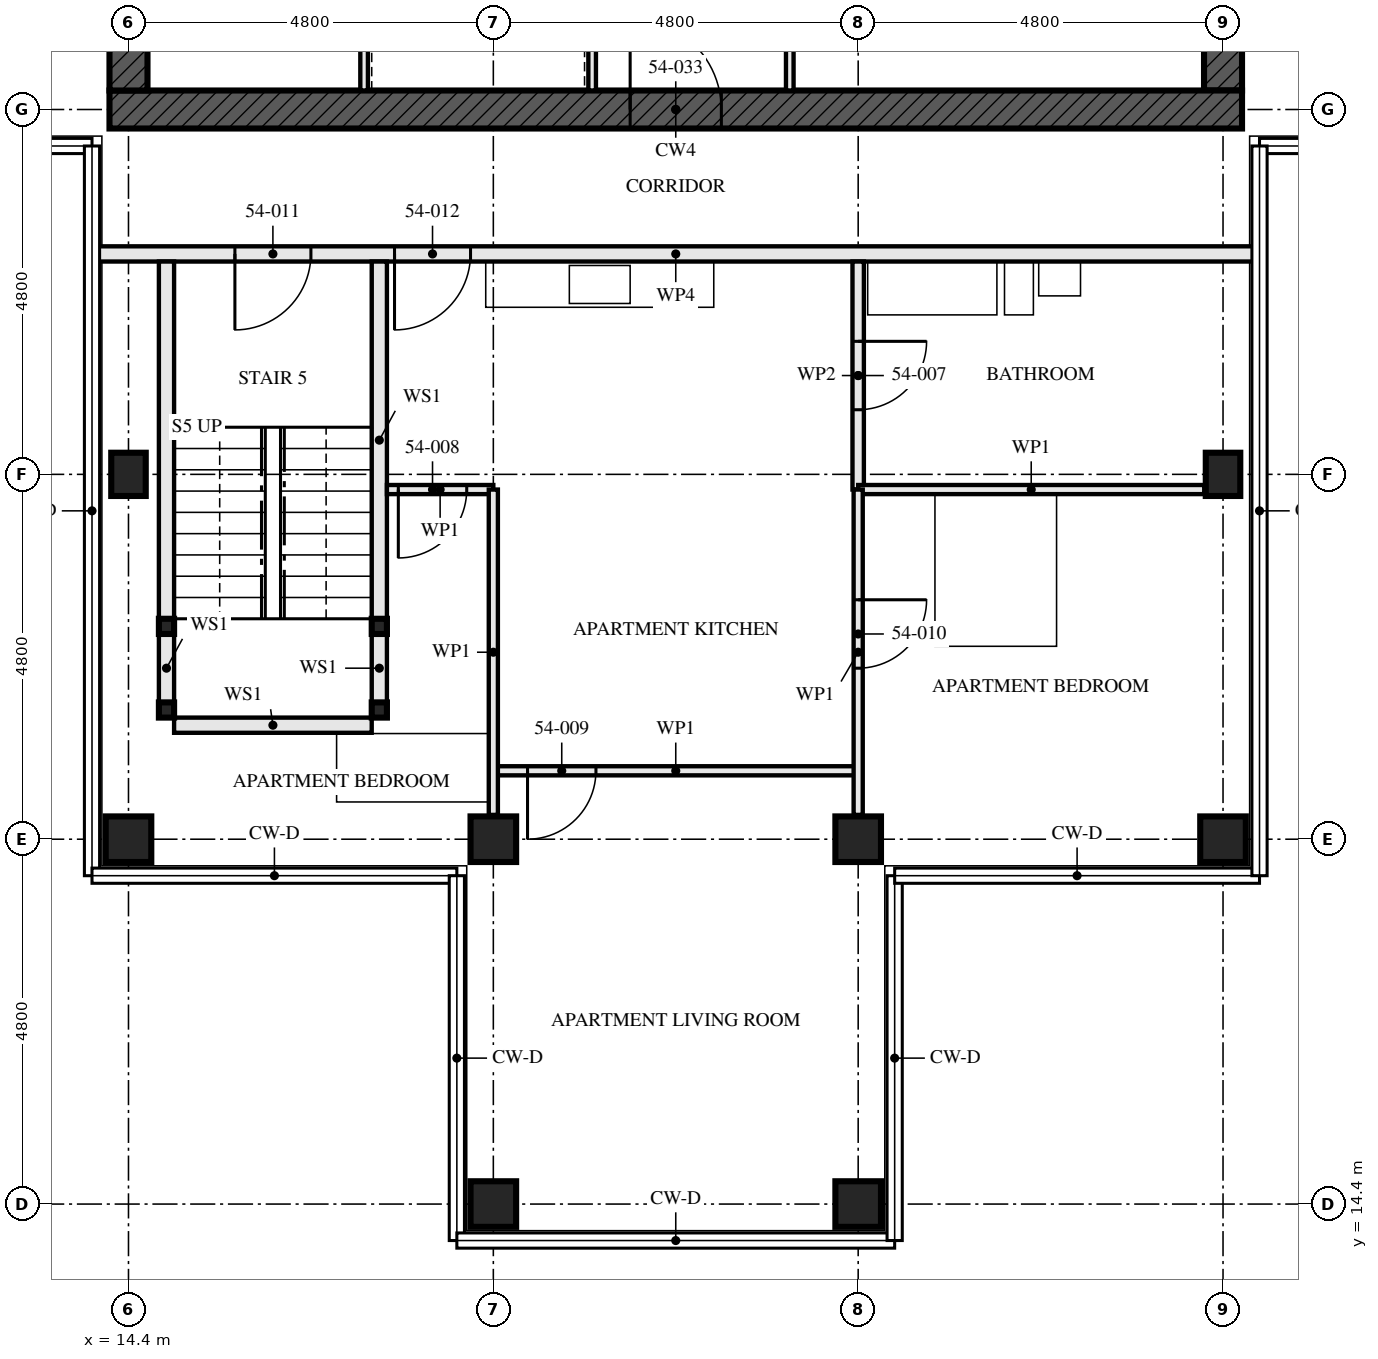
"""IFC4 building model, lengths in metres.
Left out: names, types, materials, properties, quantities, classifications, styles, units other than length and angle.
Written with IfcOpenShell. Run it as: python <this file> out.ifc"""

import sys

from ifc_helpers import new_model, si_unit, direction, frame, frame_2d, origin, origin_2d, place, context, subcontext, project, spatial, rectangle, hollow_rectangle, i_section, extrude, element, fill, save


model = new_model("IFC4")
c1 = context("Model", 3, precision=1e-05, world=origin(), true_north=direction((0.0, 1.0)))
c2 = subcontext(c1, "Body", "Model", "MODEL_VIEW")
j1 = project(units=[si_unit("LENGTHUNIT", "METRE"), si_unit("PLANEANGLEUNIT", "RADIAN")], contexts=[c1])
p1 = place(None, origin())
s1 = spatial("IfcSite", under=j1, at=p1, CompositionType="ELEMENT")
p2 = place(p1, origin())
s2 = spatial("IfcBuilding", under=s1, at=p2, CompositionType="ELEMENT")
p3 = place(p2, frame((0.0, 0.0, 198.0)))
s3 = spatial("IfcBuildingStorey", under=s2, at=p3, CompositionType="ELEMENT", Elevation=198.0)
p4 = place(p3, frame((14.4, 19.2, 0.0), z_axis=(0.0, 0.0, 1.0), x_axis=(0.0, 1.0, 0.0)))
e1 = element("IfcColumn", 1, at=p4, inside=s3, PredefinedType="COLUMN", context=c2, shape_type="SweptSolid", body=[
    extrude(hollow_rectangle(XDim=0.6, YDim=0.6, WallThickness=0.05, at=origin_2d()), origin(), (0.0, 0.0, 1.0), 3.5),
])
p5 = place(p3, frame((14.4, 24.0, 0.0), z_axis=(0.0, 0.0, 1.0), x_axis=(1.0, 0.0, 0.0)))
e2 = element("IfcColumn", 2, at=p5, inside=s3, PredefinedType="COLUMN", context=c2, shape_type="SweptSolid", body=[
    extrude(i_section(OverallWidth=0.454, OverallDepth=0.569, WebThickness=0.078, FlangeThickness=0.125, FilletRadius=0.015, at=origin_2d()), origin(), (0.0, 0.0, 1.0), 3.5),
])
for number, where, z_axis, x_axis in (
    (3, (19.2, 14.4, 0.0), (0.0, 0.0, 1.0), (0.0, 1.0, 0.0)),
    (4, (19.2, 19.2, 0.0), (0.0, 0.0, 1.0), (0.0, 1.0, 0.0)),
    (5, (24.0, 14.4, 0.0), (0.0, 0.0, 1.0), (0.0, 1.0, 0.0)),
    (6, (24.0, 19.2, 0.0), (0.0, 0.0, 1.0), (0.0, 1.0, 0.0)),
    (7, (28.8, 19.2, 0.0), (0.0, 0.0, 1.0), (0.0, 1.0, 0.0)),
):
    element("IfcColumn", number, at=place(p3, frame(where, z_axis=z_axis, x_axis=x_axis)), inside=s3, PredefinedType="COLUMN", context=c2, shape_type="SweptSolid", body=[
        extrude(hollow_rectangle(XDim=0.6, YDim=0.6, WallThickness=0.05, at=origin_2d()), origin(), (0.0, 0.0, 1.0), 3.5),
    ])
p6 = place(p3, frame((28.8, 24.0, 0.0), z_axis=(0.0, 0.0, 1.0), x_axis=(1.0, 0.0, 0.0)))
e8 = element("IfcColumn", 8, at=p6, inside=s3, PredefinedType="COLUMN", context=c2, shape_type="SweptSolid", body=[
    extrude(i_section(OverallWidth=0.454, OverallDepth=0.569, WebThickness=0.078, FlangeThickness=0.125, FilletRadius=0.015, at=origin_2d()), origin(), (0.0, 0.0, 1.0), 3.5),
])
p7 = place(p3, frame((14.15, 28.8, -0.17), z_axis=(0.0, 0.0, 1.0), x_axis=(1.0, 0.0, 0.0)))
e9 = element("IfcWall", 9, at=p7, inside=s3, PredefinedType="SHEAR", context=c2, shape_type="SweptSolid", body=[
    extrude(rectangle(XDim=14.9, YDim=0.5, at=frame_2d((7.45, 0.0))), origin(), (0.0, 0.0, 1.0), 3.5),
])
p8 = place(p7, frame((6.85, 0.0, 0.17)))
e10 = element("IfcOpeningElement", 10, at=p8, cuts=e9, PredefinedType="OPENING", context=c2, shape_type="SweptSolid", body=[
    extrude(rectangle(XDim=1.2, YDim=2.1, at=frame_2d((0.6, 1.05))), frame((0.0, 0.26, 0.0), z_axis=(0.0, -1.0, 0.0), x_axis=(1.0, 0.0, 0.0)), (0.0, 0.0, 1.0), 0.521),
])
p9 = place(p3, frame((14.4, 42.95, -0.17), z_axis=(0.0, 0.0, 1.0), x_axis=(0.0, -1.0, 0.0)))
e11 = element("IfcWall", 11, at=p9, inside=s3, PredefinedType="SHEAR", context=c2, shape_type="SweptSolid", body=[
    extrude(rectangle(XDim=13.9, YDim=0.5, at=frame_2d((6.95, 0.0))), origin(), (0.0, 0.0, 1.0), 3.5),
])
p10 = place(p9, frame((6.35, 0.0, 0.17)))
e12 = element("IfcOpeningElement", 12, at=p10, cuts=e11, PredefinedType="OPENING", context=c2, shape_type="SweptSolid", body=[
    extrude(rectangle(XDim=1.2, YDim=2.1, at=frame_2d((0.6, 1.05))), frame((0.0, 0.26, 0.0), z_axis=(0.0, -1.0, 0.0), x_axis=(1.0, 0.0, 0.0)), (0.0, 0.0, 1.0), 0.521),
])
p11 = place(p3, frame((28.8, 29.05, -0.17), z_axis=(0.0, 0.0, 1.0), x_axis=(0.0, 1.0, 0.0)))
e13 = element("IfcWall", 13, at=p11, inside=s3, PredefinedType="SHEAR", context=c2, shape_type="SweptSolid", body=[
    extrude(rectangle(XDim=13.9, YDim=0.5, at=frame_2d((6.95, 0.0))), origin(), (0.0, 0.0, 1.0), 3.5),
])
p12 = place(p11, frame((6.35, 0.0, 0.17)))
e14 = element("IfcOpeningElement", 14, at=p12, cuts=e13, PredefinedType="OPENING", context=c2, shape_type="SweptSolid", body=[
    extrude(rectangle(XDim=1.2, YDim=2.1, at=frame_2d((0.6, 1.05))), frame((0.0, 0.26, 0.0), z_axis=(0.0, -1.0, 0.0), x_axis=(1.0, 0.0, 0.0)), (0.0, 0.0, 1.0), 0.521),
])
for number, where, z_axis, x_axis in (
    (15, (14.9, 20.9, 0.0), (0.0, 0.0, 1.0), (1.0, 0.0, 0.0)),
    (16, (17.7, 20.9, 0.0), (0.0, 0.0, 1.0), (1.0, 0.0, 0.0)),
    (17, (14.9, 22.0, 0.0), (0.0, 0.0, 1.0), (1.0, 0.0, 0.0)),
    (18, (17.7, 22.0, 0.0), (0.0, 0.0, 1.0), (1.0, 0.0, 0.0)),
):
    element("IfcColumn", number, at=place(p3, frame(where, z_axis=z_axis, x_axis=x_axis)), inside=s3, PredefinedType="COLUMN", context=c2, shape_type="SweptSolid", body=[
        extrude(hollow_rectangle(XDim=0.2, YDim=0.2, WallThickness=0.008, at=origin_2d()), origin(), (0.0, 0.0, 1.0), 3.33),
    ])
p13 = place(p3, frame((14.9, 21.0, 0.0), z_axis=(0.0, 0.0, 1.0), x_axis=(0.0, 1.0, 0.0)))
e19 = element("IfcWall", 19, at=p13, inside=s3, PredefinedType="SOLIDWALL", context=c2, shape_type="SweptSolid", body=[
    extrude(rectangle(XDim=0.9, YDim=0.2, at=frame_2d((0.45, 0.0))), origin(), (0.0, 0.0, 1.0), 2.99),
])
p14 = place(p3, frame((14.9, 22.1, 0.0), z_axis=(0.0, 0.0, 1.0), x_axis=(0.0, 1.0, 0.0)))
e20 = element("IfcWall", 20, at=p14, inside=s3, PredefinedType="SOLIDWALL", context=c2, shape_type="SweptSolid", body=[
    extrude(rectangle(XDim=4.7, YDim=0.2, at=frame_2d((2.35, 0.0))), origin(), (0.0, 0.0, 1.0), 2.99),
])
p15 = place(p3, frame((17.7, 21.0, 0.0), z_axis=(0.0, 0.0, 1.0), x_axis=(0.0, 1.0, 0.0)))
e21 = element("IfcWall", 21, at=p15, inside=s3, PredefinedType="SOLIDWALL", context=c2, shape_type="SweptSolid", body=[
    extrude(rectangle(XDim=0.9, YDim=0.2, at=frame_2d((0.45, 0.0))), origin(), (0.0, 0.0, 1.0), 2.99),
])
p16 = place(p3, frame((17.7, 22.1, 0.0), z_axis=(0.0, 0.0, 1.0), x_axis=(0.0, 1.0, 0.0)))
e22 = element("IfcWall", 22, at=p16, inside=s3, PredefinedType="SOLIDWALL", context=c2, shape_type="SweptSolid", body=[
    extrude(rectangle(XDim=4.7, YDim=0.2, at=frame_2d((2.35, 0.0))), origin(), (0.0, 0.0, 1.0), 2.99),
])
p17 = place(p3, frame((15.0, 20.7, 0.0), z_axis=(0.0, 0.0, 1.0), x_axis=(1.0, 0.0, 0.0)))
e23 = element("IfcWall", 23, at=p17, inside=s3, PredefinedType="SOLIDWALL", context=c2, shape_type="SweptSolid", body=[
    extrude(rectangle(XDim=2.6, YDim=0.2, at=frame_2d((1.3, 0.0))), origin(), (0.0, 0.0, 1.0), 3.33),
])
p18 = place(p3, frame((24.0, 23.8, 0.0), z_axis=(0.0, 0.0, 1.0), x_axis=(0.0, 1.0, 0.0)))
e24 = element("IfcWall", 24, at=p18, inside=s3, PredefinedType="PARTITIONING", context=c2, shape_type="SweptSolid", body=[
    extrude(rectangle(XDim=3.0, YDim=0.15, at=frame_2d((1.5, 0.0))), origin(), (0.0, 0.0, 1.0), 2.55),
])
p19 = place(p18, frame((1.05, 0.0, 0.0)))
e25 = element("IfcOpeningElement", 25, at=p19, cuts=e24, PredefinedType="OPENING", context=c2, shape_type="SweptSolid", body=[
    extrude(rectangle(XDim=0.9, YDim=2.1, at=frame_2d((0.45, 1.05))), frame((0.0, 0.085, 0.0), z_axis=(0.0, -1.0, 0.0), x_axis=(1.0, 0.0, 0.0)), (0.0, 0.0, 1.0), 0.171),
])
p20 = place(p3, frame((17.8, 23.8, 0.0), z_axis=(0.0, 0.0, 1.0), x_axis=(1.0, 0.0, 0.0)))
e26 = element("IfcWall", 26, at=p20, inside=s3, PredefinedType="PARTITIONING", context=c2, shape_type="SweptSolid", body=[
    extrude(rectangle(XDim=1.4, YDim=0.12, at=frame_2d((0.7, 0.0))), origin(), (0.0, 0.0, 1.0), 3.33),
])
p21 = place(p20, frame((0.15, 0.0, 0.0)))
e27 = element("IfcOpeningElement", 27, at=p21, cuts=e26, PredefinedType="OPENING", context=c2, shape_type="SweptSolid", body=[
    extrude(rectangle(XDim=0.9, YDim=2.1, at=frame_2d((0.45, 1.05))), frame((0.0, 0.071, 0.0), z_axis=(0.0, -1.0, 0.0), x_axis=(1.0, 0.0, 0.0)), (0.0, 0.0, 1.0), 0.141),
])
p22 = place(p3, frame((19.2, 20.1, 0.0), z_axis=(0.0, 0.0, 1.0), x_axis=(1.0, 0.0, 0.0)))
e28 = element("IfcWall", 28, at=p22, inside=s3, PredefinedType="PARTITIONING", context=c2, shape_type="SweptSolid", body=[
    extrude(rectangle(XDim=4.8, YDim=0.12, at=frame_2d((2.4, 0.0))), origin(), (0.0, 0.0, 1.0), 3.33),
])
p23 = place(p22, frame((0.45, 0.0, 0.0)))
e29 = element("IfcOpeningElement", 29, at=p23, cuts=e28, PredefinedType="OPENING", context=c2, shape_type="SweptSolid", body=[
    extrude(rectangle(XDim=0.9, YDim=2.1, at=frame_2d((0.45, 1.05))), frame((0.0, 0.071, 0.0), z_axis=(0.0, -1.0, 0.0), x_axis=(1.0, 0.0, 0.0)), (0.0, 0.0, 1.0), 0.141),
])
p24 = place(p3, frame((24.0, 23.8, 0.0), z_axis=(0.0, 0.0, 1.0), x_axis=(1.0, 0.0, 0.0)))
e30 = element("IfcWall", 30, at=p24, inside=s3, PredefinedType="PARTITIONING", context=c2, shape_type="SweptSolid", body=[
    extrude(rectangle(XDim=4.553, YDim=0.12, at=frame_2d((2.276, 0.0))), origin(), (0.0, 0.0, 1.0), 3.33),
])
p25 = place(p3, frame((19.2, 19.52, 0.0), z_axis=(0.0, 0.0, 1.0), x_axis=(0.0, 1.0, 0.0)))
e31 = element("IfcWall", 31, at=p25, inside=s3, PredefinedType="PARTITIONING", context=c2, shape_type="SweptSolid", body=[
    extrude(rectangle(XDim=4.28, YDim=0.12, at=frame_2d((2.14, 0.0))), origin(), (0.0, 0.0, 1.0), 2.55),
])
p26 = place(p3, frame((24.0, 19.52, 0.0), z_axis=(0.0, 0.0, 1.0), x_axis=(0.0, 1.0, 0.0)))
e32 = element("IfcWall", 32, at=p26, inside=s3, PredefinedType="PARTITIONING", context=c2, shape_type="SweptSolid", body=[
    extrude(rectangle(XDim=4.28, YDim=0.12, at=frame_2d((2.14, 0.0))), origin(), (0.0, 0.0, 1.0), 3.33),
])
p27 = place(p26, frame((1.93, 0.0, 0.0)))
e33 = element("IfcOpeningElement", 33, at=p27, cuts=e32, PredefinedType="OPENING", context=c2, shape_type="SweptSolid", body=[
    extrude(rectangle(XDim=0.9, YDim=2.1, at=frame_2d((0.45, 1.05))), frame((0.0, 0.071, 0.0), z_axis=(0.0, -1.0, 0.0), x_axis=(1.0, 0.0, 0.0)), (0.0, 0.0, 1.0), 0.141),
])
p28 = place(p3, frame((13.945, 26.9, 0.0), z_axis=(0.0, 0.0, 1.0), x_axis=(1.0, 0.0, 0.0)))
e34 = element("IfcWall", 34, at=p28, inside=s3, PredefinedType="PARTITIONING", context=c2, shape_type="SweptSolid", body=[
    extrude(rectangle(XDim=15.31, YDim=0.2, at=frame_2d((7.655, 0.0))), origin(), (0.0, 0.0, 1.0), 2.32),
])
p29 = place(p28, frame((1.855, 0.0, 0.0)))
e35 = element("IfcOpeningElement", 35, at=p29, cuts=e34, PredefinedType="OPENING", context=c2, shape_type="SweptSolid", body=[
    extrude(rectangle(XDim=1.0, YDim=2.1, at=frame_2d((0.5, 1.05))), frame((0.0, 0.111, 0.0), z_axis=(0.0, -1.0, 0.0), x_axis=(1.0, 0.0, 0.0)), (0.0, 0.0, 1.0), 0.221),
])
p30 = place(p28, frame((3.955, 0.0, 0.0)))
e36 = element("IfcOpeningElement", 36, at=p30, cuts=e34, PredefinedType="OPENING", context=c2, shape_type="SweptSolid", body=[
    extrude(rectangle(XDim=1.0, YDim=2.1, at=frame_2d((0.5, 1.05))), frame((0.0, 0.111, 0.0), z_axis=(0.0, -1.0, 0.0), x_axis=(1.0, 0.0, 0.0)), (0.0, 0.0, 1.0), 0.221),
])
p31 = place(p3, frame((20.5, 29.05, 0.0), z_axis=(0.0, 0.0, 1.0), x_axis=(0.0, 1.0, 0.0)))
e37 = element("IfcWall", 37, at=p31, inside=s3, PredefinedType="SOLIDWALL", context=c2, shape_type="SweptSolid", body=[
    extrude(rectangle(XDim=5.8, YDim=0.1, at=frame_2d((2.9, 0.0))), origin(), (0.0, 0.0, 1.0), 3.33),
])
p32 = place(p31, frame((0.8, 0.0, 0.0)))
e38 = element("IfcOpeningElement", 38, at=p32, cuts=e37, PredefinedType="OPENING", context=c2, shape_type="SweptSolid", body=[
    extrude(rectangle(XDim=1.1, YDim=2.3, at=frame_2d((0.55, 1.15))), frame((0.0, 0.061, 0.0), z_axis=(0.0, -1.0, 0.0), x_axis=(1.0, 0.0, 0.0)), (0.0, 0.0, 1.0), 0.121),
])
p33 = place(p31, frame((3.775, 0.0, 0.0)))
e39 = element("IfcOpeningElement", 39, at=p33, cuts=e37, PredefinedType="OPENING", context=c2, shape_type="SweptSolid", body=[
    extrude(rectangle(XDim=1.1, YDim=2.3, at=frame_2d((0.55, 1.15))), frame((0.0, 0.061, 0.0), z_axis=(0.0, -1.0, 0.0), x_axis=(1.0, 0.0, 0.0)), (0.0, 0.0, 1.0), 0.121),
])
p34 = place(p3, frame((23.1, 29.05, 0.0), z_axis=(0.0, 0.0, 1.0), x_axis=(0.0, 1.0, 0.0)))
e40 = element("IfcWall", 40, at=p34, inside=s3, PredefinedType="SOLIDWALL", context=c2, shape_type="SweptSolid", body=[
    extrude(rectangle(XDim=5.8, YDim=0.1, at=frame_2d((2.9, 0.0))), origin(), (0.0, 0.0, 1.0), 3.33),
])
p35 = place(p34, frame((1.0, 0.0, 0.0)))
e41 = element("IfcOpeningElement", 41, at=p35, cuts=e40, PredefinedType="OPENING", context=c2, shape_type="SweptSolid", body=[
    extrude(rectangle(XDim=0.7, YDim=2.1, at=frame_2d((0.35, 1.05))), frame((0.0, 0.061, 0.0), z_axis=(0.0, -1.0, 0.0), x_axis=(1.0, 0.0, 0.0)), (0.0, 0.0, 1.0), 0.121),
])
p36 = place(p3, frame((17.5, 29.05, 0.0), z_axis=(0.0, 0.0, 1.0), x_axis=(0.0, 1.0, 0.0)))
e42 = element("IfcWall", 42, at=p36, inside=s3, PredefinedType="SOLIDWALL", context=c2, shape_type="SweptSolid", body=[
    extrude(rectangle(XDim=5.8, YDim=0.1, at=frame_2d((2.9, 0.0))), origin(), (0.0, 0.0, 1.0), 3.33),
])
p37 = place(p19, frame((0.9, 0.0, 0.0), z_axis=(0.0, 0.0, 1.0), x_axis=(-1.0, 0.0, 0.0)))
e43 = element("IfcDoor", 43, at=p37, inside=s3, OperationType="SINGLE_SWING_RIGHT", PredefinedType="DOOR", context=c2, shape_type="SweptSolid", body=[
    extrude(rectangle(XDim=0.9, YDim=2.1, at=frame_2d((0.45, 1.05))), frame((0.0, 0.022, 0.0), z_axis=(0.0, -1.0, 0.0), x_axis=(1.0, 0.0, 0.0)), (0.0, 0.0, 1.0), 0.044),
])
fill(e25, e43)
p38 = place(p21, frame((0.9, 0.0, 0.0), z_axis=(0.0, 0.0, 1.0), x_axis=(-1.0, 0.0, 0.0)))
e44 = element("IfcDoor", 44, at=p38, inside=s3, OperationType="SINGLE_SWING_LEFT", PredefinedType="DOOR", context=c2, shape_type="SweptSolid", body=[
    extrude(rectangle(XDim=0.9, YDim=2.1, at=frame_2d((0.45, 1.05))), frame((0.0, 0.022, 0.0), z_axis=(0.0, -1.0, 0.0), x_axis=(1.0, 0.0, 0.0)), (0.0, 0.0, 1.0), 0.044),
])
fill(e27, e44)
p39 = place(p23, frame((0.9, 0.0, 0.0), z_axis=(0.0, 0.0, 1.0), x_axis=(-1.0, 0.0, 0.0)))
e45 = element("IfcDoor", 45, at=p39, inside=s3, OperationType="SINGLE_SWING_LEFT", PredefinedType="DOOR", context=c2, shape_type="SweptSolid", body=[
    extrude(rectangle(XDim=0.9, YDim=2.1, at=frame_2d((0.45, 1.05))), frame((0.0, 0.022, 0.0), z_axis=(0.0, -1.0, 0.0), x_axis=(1.0, 0.0, 0.0)), (0.0, 0.0, 1.0), 0.044),
])
fill(e29, e45)
p40 = place(p27, frame((0.9, 0.0, 0.0), z_axis=(0.0, 0.0, 1.0), x_axis=(-1.0, 0.0, 0.0)))
e46 = element("IfcDoor", 46, at=p40, inside=s3, OperationType="SINGLE_SWING_RIGHT", PredefinedType="DOOR", context=c2, shape_type="SweptSolid", body=[
    extrude(rectangle(XDim=0.9, YDim=2.1, at=frame_2d((0.45, 1.05))), frame((0.0, 0.022, 0.0), z_axis=(0.0, -1.0, 0.0), x_axis=(1.0, 0.0, 0.0)), (0.0, 0.0, 1.0), 0.044),
])
fill(e33, e46)
p41 = place(p29, frame((1.0, 0.0, 0.0), z_axis=(0.0, 0.0, 1.0), x_axis=(-1.0, 0.0, 0.0)))
e47 = element("IfcDoor", 47, at=p41, inside=s3, OperationType="SINGLE_SWING_LEFT", PredefinedType="DOOR", context=c2, shape_type="SweptSolid", body=[
    extrude(rectangle(XDim=1.0, YDim=2.1, at=frame_2d((0.5, 1.05))), frame((0.0, 0.032, 0.0), z_axis=(0.0, -1.0, 0.0), x_axis=(1.0, 0.0, 0.0)), (0.0, 0.0, 1.0), 0.064),
])
fill(e35, e47)
p42 = place(p30, frame((1.0, 0.0, 0.0), z_axis=(0.0, 0.0, 1.0), x_axis=(-1.0, 0.0, 0.0)))
e48 = element("IfcDoor", 48, at=p42, inside=s3, OperationType="SINGLE_SWING_LEFT", PredefinedType="DOOR", context=c2, shape_type="SweptSolid", body=[
    extrude(rectangle(XDim=1.0, YDim=2.1, at=frame_2d((0.5, 1.05))), frame((0.0, 0.027, 0.0), z_axis=(0.0, -1.0, 0.0), x_axis=(1.0, 0.0, 0.0)), (0.0, 0.0, 1.0), 0.054),
])
fill(e36, e48)
p43 = place(p8, origin())
e49 = element("IfcDoor", 49, at=p43, inside=s3, OperationType="SINGLE_SWING_LEFT", PredefinedType="DOOR", context=c2, shape_type="SweptSolid", body=[
    extrude(rectangle(XDim=1.2, YDim=2.1, at=frame_2d((0.6, 1.05))), frame((0.0, 0.027, 0.0), z_axis=(0.0, -1.0, 0.0), x_axis=(1.0, 0.0, 0.0)), (0.0, 0.0, 1.0), 0.054),
])
fill(e10, e49)
save(model, sys.argv[1])
